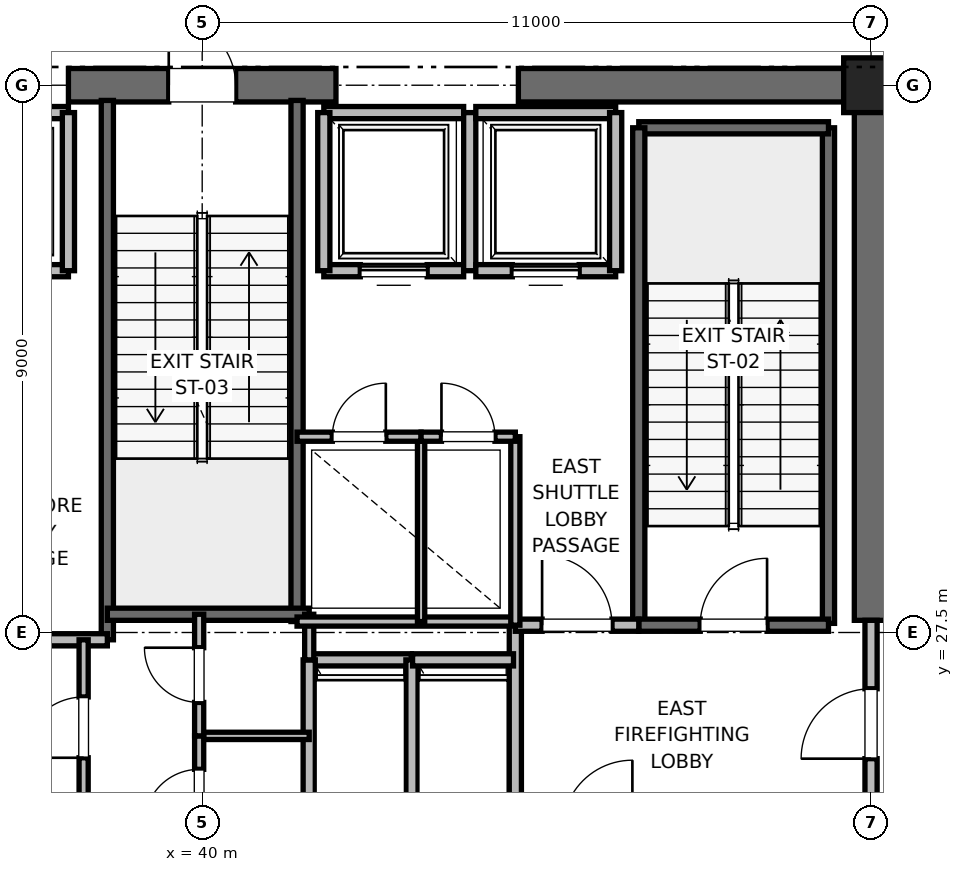
"""IFC4 building model, lengths in metres.
Left out: names, types, materials, properties, quantities, classifications, styles, units other than length and angle.
Written with IfcOpenShell. Run it as: python <this file> out.ifc"""

import sys

from ifc_helpers import new_model, si_unit, direction, frame, frame_2d, origin, origin_2d, place, context, subcontext, project, spatial, rectangle, extrude, element, fill, save


model = new_model("IFC4")
c1 = context("Model", 3, precision=1e-05, world=origin(), true_north=direction((0.0, 1.0)))
c2 = subcontext(c1, "Body", "Model", "MODEL_VIEW")
j1 = project(units=[si_unit("LENGTHUNIT", "METRE"), si_unit("PLANEANGLEUNIT", "RADIAN")], contexts=[c1])
p1 = place(None, origin())
s1 = spatial("IfcSite", under=j1, at=p1, CompositionType="ELEMENT")
p2 = place(p1, origin())
s2 = spatial("IfcBuilding", under=s1, at=p2, CompositionType="ELEMENT")
p3 = place(p2, frame((0.0, 0.0, 233.2)))
s3 = spatial("IfcBuildingStorey", under=s2, at=p3, CompositionType="ELEMENT", Elevation=233.2)
p4 = place(p3, frame((51.0, 36.5, 0.0), z_axis=(0.0, 0.0, 1.0), x_axis=(1.0, 0.0, 0.0)))
e1 = element("IfcColumn", 1, at=p4, inside=s3, PredefinedType="PILASTER", context=c2, shape_type="SweptSolid", body=[
    extrude(rectangle(XDim=0.9, YDim=0.9, at=origin_2d()), origin(), (0.0, 0.0, 1.0), 5.0),
])
p5 = place(p3, frame((37.8, 36.5, 0.0), z_axis=(0.0, 0.0, 1.0), x_axis=(1.0, 0.0, 0.0)))
e2 = element("IfcWall", 2, at=p5, inside=s3, PredefinedType="SHEAR", context=c2, shape_type="SweptSolid", body=[
    extrude(rectangle(XDim=4.4, YDim=0.55, at=frame_2d((2.2, 0.0))), origin(), (0.0, 0.0, 1.0), 4.7),
])
p6 = place(p5, frame((1.65, 0.0, 0.0)))
e3 = element("IfcOpeningElement", 3, at=p6, cuts=e2, PredefinedType="OPENING", context=c2, shape_type="SweptSolid", body=[
    extrude(rectangle(XDim=1.1, YDim=2.15, at=frame_2d((0.55, 1.075))), frame((0.0, 0.275, 0.0), z_axis=(0.0, -1.0, 0.0), x_axis=(1.0, 0.0, 0.0)), (0.0, 0.0, 1.0), 0.55),
])
p7 = place(p3, frame((45.2, 36.5, 0.0), z_axis=(0.0, 0.0, 1.0), x_axis=(1.0, 0.0, 0.0)))
e4 = element("IfcWall", 4, at=p7, inside=s3, PredefinedType="SHEAR", context=c2, shape_type="SweptSolid", body=[
    extrude(rectangle(XDim=5.8, YDim=0.55, at=frame_2d((2.9, 0.0))), origin(), (0.0, 0.0, 1.0), 4.7),
])
p8 = place(p3, frame((51.0, 27.7, 0.0), z_axis=(0.0, 0.0, 1.0), x_axis=(0.0, 1.0, 0.0)))
e5 = element("IfcWall", 5, at=p8, inside=s3, PredefinedType="SHEAR", context=c2, shape_type="SweptSolid", body=[
    extrude(rectangle(XDim=8.8, YDim=0.55, at=frame_2d((4.4, 0.0))), origin(), (0.0, 0.0, 1.0), 4.7),
])
p9 = place(p3, frame((50.3, 27.65, 0.0), z_axis=(0.0, 0.0, 1.0), x_axis=(0.0, 1.0, 0.0)))
e6 = element("IfcWall", 6, at=p9, inside=s3, PredefinedType="SOLIDWALL", context=c2, shape_type="SweptSolid", body=[
    extrude(rectangle(XDim=8.15, YDim=0.2, at=frame_2d((4.075, 0.0))), origin(), (0.0, 0.0, 1.0), 4.7),
])
p10 = place(p3, frame((47.18, 35.8, 0.0), z_axis=(0.0, 0.0, 1.0), x_axis=(1.0, 0.0, 0.0)))
e7 = element("IfcWall", 7, at=p10, inside=s3, PredefinedType="SOLIDWALL", context=c2, shape_type="SweptSolid", body=[
    extrude(rectangle(XDim=3.12, YDim=0.2, at=frame_2d((1.56, 0.0))), origin(), (0.0, 0.0, 1.0), 4.7),
])
p11 = place(p3, frame((47.18, 27.62, 0.0), z_axis=(0.0, 0.0, 1.0), x_axis=(0.0, 1.0, 0.0)))
e8 = element("IfcWall", 8, at=p11, inside=s3, PredefinedType="SOLIDWALL", context=c2, shape_type="SweptSolid", body=[
    extrude(rectangle(XDim=8.18, YDim=0.2, at=frame_2d((4.09, 0.0))), origin(), (0.0, 0.0, 1.0), 4.7),
])
p12 = place(p3, frame((47.18, 27.62, 0.0), z_axis=(0.0, 0.0, 1.0), x_axis=(1.0, 0.0, 0.0)))
e9 = element("IfcWall", 9, at=p12, inside=s3, PredefinedType="SOLIDWALL", context=c2, shape_type="SweptSolid", body=[
    extrude(rectangle(XDim=3.12, YDim=0.2, at=frame_2d((1.56, 0.0))), origin(), (0.0, 0.0, 1.0), 4.7),
])
p13 = place(p12, frame((1.01, 0.0, 0.0)))
e10 = element("IfcOpeningElement", 10, at=p13, cuts=e9, PredefinedType="OPENING", context=c2, shape_type="SweptSolid", body=[
    extrude(rectangle(XDim=1.1, YDim=2.15, at=frame_2d((0.55, 1.075))), frame((0.0, 0.1, 0.0), z_axis=(0.0, -1.0, 0.0), x_axis=(1.0, 0.0, 0.0)), (0.0, 0.0, 1.0), 0.2),
])
p14 = place(p3, frame((38.44, 27.38, 0.0), z_axis=(0.0, 0.0, 1.0), x_axis=(0.0, 1.0, 0.0)))
e11 = element("IfcWall", 11, at=p14, inside=s3, PredefinedType="SOLIDWALL", context=c2, shape_type="SweptSolid", body=[
    extrude(rectangle(XDim=8.87, YDim=0.2, at=frame_2d((4.435, 0.0))), origin(), (0.0, 0.0, 1.0), 4.7),
])
p15 = place(p3, frame((41.56, 27.68, 0.0), z_axis=(0.0, 0.0, 1.0), x_axis=(0.0, 1.0, 0.0)))
e12 = element("IfcWall", 12, at=p15, inside=s3, PredefinedType="SOLIDWALL", context=c2, shape_type="SweptSolid", body=[
    extrude(rectangle(XDim=8.57, YDim=0.2, at=frame_2d((4.285, 0.0))), origin(), (0.0, 0.0, 1.0), 4.7),
])
p16 = place(p3, frame((38.44, 27.8, 0.0), z_axis=(0.0, 0.0, 1.0), x_axis=(1.0, 0.0, 0.0)))
e13 = element("IfcWall", 13, at=p16, inside=s3, PredefinedType="SOLIDWALL", context=c2, shape_type="SweptSolid", body=[
    extrude(rectangle(XDim=3.32, YDim=0.2, at=frame_2d((1.66, 0.0))), origin(), (0.0, 0.0, 1.0), 4.7),
])
p17 = place(p3, frame((32.82, 27.38, 0.0), z_axis=(0.0, 0.0, 1.0), x_axis=(1.0, 0.0, 0.0)))
e14 = element("IfcWall", 14, at=p17, inside=s3, PredefinedType="PARTITIONING", context=c2, shape_type="SweptSolid", body=[
    extrude(rectangle(XDim=5.62, YDim=0.2, at=frame_2d((2.81, 0.0))), origin(), (0.0, 0.0, 1.0), 4.7),
])
p18 = place(p3, frame((45.15, 24.25, 0.0), z_axis=(0.0, 0.0, 1.0), x_axis=(0.0, 1.0, 0.0)))
e15 = element("IfcWall", 15, at=p18, inside=s3, PredefinedType="PARTITIONING", context=c2, shape_type="SweptSolid", body=[
    extrude(rectangle(XDim=3.37, YDim=0.2, at=frame_2d((1.685, 0.0))), origin(), (0.0, 0.0, 1.0), 4.7),
])
p19 = place(p3, frame((45.15, 27.62, 0.0), z_axis=(0.0, 0.0, 1.0), x_axis=(1.0, 0.0, 0.0)))
e16 = element("IfcWall", 16, at=p19, inside=s3, PredefinedType="PARTITIONING", context=c2, shape_type="SweptSolid", body=[
    extrude(rectangle(XDim=2.03, YDim=0.2, at=frame_2d((1.015, 0.0))), origin(), (0.0, 0.0, 1.0), 4.7),
])
p20 = place(p19, frame((0.44, 0.0, 0.0)))
e17 = element("IfcOpeningElement", 17, at=p20, cuts=e16, PredefinedType="OPENING", context=c2, shape_type="SweptSolid", body=[
    extrude(rectangle(XDim=1.15, YDim=2.2, at=frame_2d((0.575, 1.1))), frame((0.0, 0.1, 0.0), z_axis=(0.0, -1.0, 0.0), x_axis=(1.0, 0.0, 0.0)), (0.0, 0.0, 1.0), 0.2),
])
p21 = place(p3, frame((51.0, 24.3, 0.0), z_axis=(0.0, 0.0, 1.0), x_axis=(0.0, 1.0, 0.0)))
e18 = element("IfcWall", 18, at=p21, inside=s3, PredefinedType="PARTITIONING", context=c2, shape_type="SweptSolid", body=[
    extrude(rectangle(XDim=3.4, YDim=0.2, at=frame_2d((1.7, 0.0))), origin(), (0.0, 0.0, 1.0), 3.68),
])
p22 = place(p21, frame((1.125, 0.0, 0.0)))
e19 = element("IfcOpeningElement", 19, at=p22, cuts=e18, PredefinedType="OPENING", context=c2, shape_type="SweptSolid", body=[
    extrude(rectangle(XDim=1.15, YDim=2.2, at=frame_2d((0.575, 1.1))), frame((0.0, 0.1, 0.0), z_axis=(0.0, -1.0, 0.0), x_axis=(1.0, 0.0, 0.0)), (0.0, 0.0, 1.0), 0.2),
])
p23 = place(p3, frame((43.44, 27.05, 0.0), z_axis=(0.0, 0.0, 1.0), x_axis=(-1.0, 0.0, 0.0)))
e20 = element("IfcWall", 20, at=p23, inside=s3, PredefinedType="SOLIDWALL", context=c2, shape_type="SweptSolid", body=[
    extrude(rectangle(XDim=1.68, YDim=0.2, at=frame_2d((0.84, 0.0))), origin(), (0.0, 0.0, 1.0), 4.7),
])
for number, where, z_axis, x_axis in (
    (21, (41.76, 27.05, 0.0), (0.0, 0.0, 1.0), (0.0, -1.0, 0.0)),
    (22, (43.45, 24.45, 0.0), (0.0, 0.0, 1.0), (0.0, 1.0, 0.0)),
):
    element("IfcWall", number, at=place(p3, frame(where, z_axis=z_axis, x_axis=x_axis)), inside=s3, PredefinedType="SOLIDWALL", context=c2, shape_type="SweptSolid", body=[
        extrude(rectangle(XDim=2.6, YDim=0.2, at=frame_2d((1.3, 0.0))), origin(), (0.0, 0.0, 1.0), 4.7),
    ])
p24 = place(p3, frame((45.12, 27.05, 0.0), z_axis=(0.0, 0.0, 1.0), x_axis=(-1.0, 0.0, 0.0)))
e23 = element("IfcWall", 23, at=p24, inside=s3, PredefinedType="SOLIDWALL", context=c2, shape_type="SweptSolid", body=[
    extrude(rectangle(XDim=1.66, YDim=0.2, at=frame_2d((0.83, 0.0))), origin(), (0.0, 0.0, 1.0), 4.7),
])
p25 = place(p3, frame((35.5, 33.45, 0.0), z_axis=(0.0, 0.0, 1.0), x_axis=(1.0, 0.0, 0.0)))
e24 = element("IfcWall", 24, at=p25, inside=s3, PredefinedType="SOLIDWALL", context=c2, shape_type="SweptSolid", body=[
    extrude(rectangle(XDim=2.3, YDim=0.2, at=frame_2d((1.15, 0.0))), origin(), (0.0, 0.0, 1.0), 4.7),
])
p26 = place(p25, frame((0.6, 0.0, 0.0)))
e25 = element("IfcOpeningElement", 25, at=p26, cuts=e24, PredefinedType="OPENING", context=c2, shape_type="SweptSolid", body=[
    extrude(rectangle(XDim=1.1, YDim=2.2, at=frame_2d((0.55, 1.1))), frame((0.0, 0.1, 0.0), z_axis=(0.0, -1.0, 0.0), x_axis=(1.0, 0.0, 0.0)), (0.0, 0.0, 1.0), 0.2),
])
p27 = place(p3, frame((37.8, 36.05, 0.0), z_axis=(0.0, 0.0, 1.0), x_axis=(-1.0, 0.0, 0.0)))
e26 = element("IfcWall", 26, at=p27, inside=s3, PredefinedType="SOLIDWALL", context=c2, shape_type="SweptSolid", body=[
    extrude(rectangle(XDim=2.3, YDim=0.2, at=frame_2d((1.15, 0.0))), origin(), (0.0, 0.0, 1.0), 3.68),
])
p28 = place(p3, frame((37.8, 33.45, 0.0), z_axis=(0.0, 0.0, 1.0), x_axis=(0.0, 1.0, 0.0)))
e27 = element("IfcWall", 27, at=p28, inside=s3, PredefinedType="SOLIDWALL", context=c2, shape_type="SweptSolid", body=[
    extrude(rectangle(XDim=2.6, YDim=0.2, at=frame_2d((1.3, 0.0))), origin(), (0.0, 0.0, 1.0), 3.68),
])
p29 = place(p3, frame((42.0, 33.45, 0.0), z_axis=(0.0, 0.0, 1.0), x_axis=(1.0, 0.0, 0.0)))
e28 = element("IfcWall", 28, at=p29, inside=s3, PredefinedType="SOLIDWALL", context=c2, shape_type="SweptSolid", body=[
    extrude(rectangle(XDim=2.3, YDim=0.2, at=frame_2d((1.15, 0.0))), origin(), (0.0, 0.0, 1.0), 4.7),
])
p30 = place(p29, frame((0.6, 0.0, 0.0)))
e29 = element("IfcOpeningElement", 29, at=p30, cuts=e28, PredefinedType="OPENING", context=c2, shape_type="SweptSolid", body=[
    extrude(rectangle(XDim=1.1, YDim=2.2, at=frame_2d((0.55, 1.1))), frame((0.0, 0.1, 0.0), z_axis=(0.0, -1.0, 0.0), x_axis=(1.0, 0.0, 0.0)), (0.0, 0.0, 1.0), 0.2),
])
p31 = place(p3, frame((44.3, 36.05, 0.0), z_axis=(0.0, 0.0, 1.0), x_axis=(-1.0, 0.0, 0.0)))
e30 = element("IfcWall", 30, at=p31, inside=s3, PredefinedType="SOLIDWALL", context=c2, shape_type="SweptSolid", body=[
    extrude(rectangle(XDim=2.3, YDim=0.2, at=frame_2d((1.15, 0.0))), origin(), (0.0, 0.0, 1.0), 3.68),
])
for number, where, z_axis, x_axis in (
    (31, (42.0, 36.05, 0.0), (0.0, 0.0, 1.0), (0.0, -1.0, 0.0)),
    (32, (44.4, 33.45, 0.0), (0.0, 0.0, 1.0), (0.0, 1.0, 0.0)),
):
    element("IfcWall", number, at=place(p3, frame(where, z_axis=z_axis, x_axis=x_axis)), inside=s3, PredefinedType="SOLIDWALL", context=c2, shape_type="SweptSolid", body=[
        extrude(rectangle(XDim=2.6, YDim=0.2, at=frame_2d((1.3, 0.0))), origin(), (0.0, 0.0, 1.0), 3.68),
    ])
p32 = place(p3, frame((44.5, 33.45, 0.0), z_axis=(0.0, 0.0, 1.0), x_axis=(1.0, 0.0, 0.0)))
e33 = element("IfcWall", 33, at=p32, inside=s3, PredefinedType="SOLIDWALL", context=c2, shape_type="SweptSolid", body=[
    extrude(rectangle(XDim=2.3, YDim=0.2, at=frame_2d((1.15, 0.0))), origin(), (0.0, 0.0, 1.0), 4.7),
])
p33 = place(p32, frame((0.6, 0.0, 0.0)))
e34 = element("IfcOpeningElement", 34, at=p33, cuts=e33, PredefinedType="OPENING", context=c2, shape_type="SweptSolid", body=[
    extrude(rectangle(XDim=1.1, YDim=2.2, at=frame_2d((0.55, 1.1))), frame((0.0, 0.1, 0.0), z_axis=(0.0, -1.0, 0.0), x_axis=(1.0, 0.0, 0.0)), (0.0, 0.0, 1.0), 0.2),
])
p34 = place(p3, frame((46.8, 36.05, 0.0), z_axis=(0.0, 0.0, 1.0), x_axis=(-1.0, 0.0, 0.0)))
e35 = element("IfcWall", 35, at=p34, inside=s3, PredefinedType="SOLIDWALL", context=c2, shape_type="SweptSolid", body=[
    extrude(rectangle(XDim=2.3, YDim=0.2, at=frame_2d((1.15, 0.0))), origin(), (0.0, 0.0, 1.0), 3.68),
])
p35 = place(p3, frame((46.8, 33.45, 0.0), z_axis=(0.0, 0.0, 1.0), x_axis=(0.0, 1.0, 0.0)))
e36 = element("IfcWall", 36, at=p35, inside=s3, PredefinedType="SOLIDWALL", context=c2, shape_type="SweptSolid", body=[
    extrude(rectangle(XDim=2.6, YDim=0.2, at=frame_2d((1.3, 0.0))), origin(), (0.0, 0.0, 1.0), 4.7),
])
p36 = place(p3, frame((39.95, 25.8, 0.0), z_axis=(0.0, 0.0, 1.0), x_axis=(1.0, 0.0, 0.0)))
e37 = element("IfcWall", 37, at=p36, inside=s3, PredefinedType="PARTITIONING", context=c2, shape_type="SweptSolid", body=[
    extrude(rectangle(XDim=1.81, YDim=0.12, at=frame_2d((0.905, 0.0))), origin(), (0.0, 0.0, 1.0), 2.85),
])
p37 = place(p3, frame((41.76, 27.05, 0.0), z_axis=(0.0, 0.0, 1.0), x_axis=(0.0, 1.0, 0.0)))
e38 = element("IfcWall", 38, at=p37, inside=s3, PredefinedType="PARTITIONING", context=c2, shape_type="SweptSolid", body=[
    extrude(rectangle(XDim=0.75, YDim=0.15, at=frame_2d((0.375, 0.0))), origin(), (0.0, 0.0, 1.0), 2.85),
])
p38 = place(p3, frame((39.95, 23.8, 0.0), z_axis=(0.0, 0.0, 1.0), x_axis=(0.0, 1.0, 0.0)))
e39 = element("IfcWall", 39, at=p38, inside=s3, PredefinedType="PARTITIONING", context=c2, shape_type="SweptSolid", body=[
    extrude(rectangle(XDim=2.0, YDim=0.15, at=frame_2d((1.0, 0.0))), origin(), (0.0, 0.0, 1.0), 2.85),
])
p39 = place(p38, frame((0.55, 0.0, 0.0)))
e40 = element("IfcOpeningElement", 40, at=p39, cuts=e39, PredefinedType="OPENING", context=c2, shape_type="SweptSolid", body=[
    extrude(rectangle(XDim=0.9, YDim=2.1, at=frame_2d((0.45, 1.05))), frame((0.0, 0.075, 0.0), z_axis=(0.0, -1.0, 0.0), x_axis=(1.0, 0.0, 0.0)), (0.0, 0.0, 1.0), 0.15),
])
p40 = place(p3, frame((39.95, 25.8, 0.0), z_axis=(0.0, 0.0, 1.0), x_axis=(0.0, 1.0, 0.0)))
e41 = element("IfcWall", 41, at=p40, inside=s3, PredefinedType="PARTITIONING", context=c2, shape_type="SweptSolid", body=[
    extrude(rectangle(XDim=2.0, YDim=0.15, at=frame_2d((1.0, 0.0))), origin(), (0.0, 0.0, 1.0), 2.85),
])
p41 = place(p40, frame((0.55, 0.0, 0.0)))
e42 = element("IfcOpeningElement", 42, at=p41, cuts=e41, PredefinedType="OPENING", context=c2, shape_type="SweptSolid", body=[
    extrude(rectangle(XDim=0.9, YDim=2.1, at=frame_2d((0.45, 1.05))), frame((0.0, 0.075, 0.0), z_axis=(0.0, -1.0, 0.0), x_axis=(1.0, 0.0, 0.0)), (0.0, 0.0, 1.0), 0.15),
])
p42 = place(p3, frame((38.05, 24.5, 0.0), z_axis=(0.0, 0.0, 1.0), x_axis=(0.0, 1.0, 0.0)))
e43 = element("IfcWall", 43, at=p42, inside=s3, PredefinedType="PARTITIONING", context=c2, shape_type="SweptSolid", body=[
    extrude(rectangle(XDim=2.88, YDim=0.15, at=frame_2d((1.44, 0.0))), origin(), (0.0, 0.0, 1.0), 2.85),
])
p43 = place(p42, frame((0.94, 0.0, 0.0)))
e44 = element("IfcOpeningElement", 44, at=p43, cuts=e43, PredefinedType="OPENING", context=c2, shape_type="SweptSolid", body=[
    extrude(rectangle(XDim=1.0, YDim=2.15, at=frame_2d((0.5, 1.075))), frame((0.0, 0.075, 0.0), z_axis=(0.0, -1.0, 0.0), x_axis=(1.0, 0.0, 0.0)), (0.0, 0.0, 1.0), 0.15),
])
p44 = place(p3, frame((41.56, 27.68, 0.0), z_axis=(0.0, 0.0, 1.0), x_axis=(1.0, 0.0, 0.0)))
e45 = element("IfcWall", 45, at=p44, inside=s3, PredefinedType="PARTITIONING", context=c2, shape_type="SweptSolid", body=[
    extrude(rectangle(XDim=3.59, YDim=0.15, at=frame_2d((1.795, 0.0))), origin(), (0.0, 0.0, 1.0), 2.85),
])
p45 = place(p3, frame((45.15, 27.62, 0.0), z_axis=(0.0, 0.0, 1.0), x_axis=(0.0, 1.0, 0.0)))
e46 = element("IfcWall", 46, at=p45, inside=s3, PredefinedType="PARTITIONING", context=c2, shape_type="SweptSolid", body=[
    extrude(rectangle(XDim=3.1, YDim=0.15, at=frame_2d((1.55, 0.0))), origin(), (0.0, 0.0, 1.0), 2.85),
])
p46 = place(p3, frame((43.6, 27.68, 0.0), z_axis=(0.0, 0.0, 1.0), x_axis=(0.0, 1.0, 0.0)))
e47 = element("IfcWall", 47, at=p46, inside=s3, PredefinedType="PARTITIONING", context=c2, shape_type="SweptSolid", body=[
    extrude(rectangle(XDim=3.04, YDim=0.12, at=frame_2d((1.52, 0.0))), origin(), (0.0, 0.0, 1.0), 2.85),
])
p47 = place(p3, frame((41.56, 30.72, 0.0), z_axis=(0.0, 0.0, 1.0), x_axis=(1.0, 0.0, 0.0)))
e48 = element("IfcWall", 48, at=p47, inside=s3, PredefinedType="PARTITIONING", context=c2, shape_type="SweptSolid", body=[
    extrude(rectangle(XDim=2.04, YDim=0.15, at=frame_2d((1.02, 0.0))), origin(), (0.0, 0.0, 1.0), 2.85),
])
p48 = place(p47, frame((0.58, 0.0, 0.0)))
e49 = element("IfcOpeningElement", 49, at=p48, cuts=e48, PredefinedType="OPENING", context=c2, shape_type="SweptSolid", body=[
    extrude(rectangle(XDim=0.88, YDim=2.1, at=frame_2d((0.44, 1.05))), frame((0.0, 0.075, 0.0), z_axis=(0.0, -1.0, 0.0), x_axis=(1.0, 0.0, 0.0)), (0.0, 0.0, 1.0), 0.15),
])
p49 = place(p3, frame((43.6, 30.72, 0.0), z_axis=(0.0, 0.0, 1.0), x_axis=(1.0, 0.0, 0.0)))
e50 = element("IfcWall", 50, at=p49, inside=s3, PredefinedType="PARTITIONING", context=c2, shape_type="SweptSolid", body=[
    extrude(rectangle(XDim=1.55, YDim=0.15, at=frame_2d((0.775, 0.0))), origin(), (0.0, 0.0, 1.0), 2.85),
])
p50 = place(p49, frame((0.335, 0.0, 0.0)))
e51 = element("IfcOpeningElement", 51, at=p50, cuts=e50, PredefinedType="OPENING", context=c2, shape_type="SweptSolid", body=[
    extrude(rectangle(XDim=0.88, YDim=2.1, at=frame_2d((0.44, 1.05))), frame((0.0, 0.075, 0.0), z_axis=(0.0, -1.0, 0.0), x_axis=(1.0, 0.0, 0.0)), (0.0, 0.0, 1.0), 0.15),
])
p51 = place(p13, origin())
e52 = element("IfcDoor", 52, at=p51, inside=s3, OperationType="SINGLE_SWING_RIGHT", PredefinedType="DOOR", context=c2, shape_type="SweptSolid", body=[
    extrude(rectangle(XDim=1.1, YDim=2.15, at=frame_2d((0.55, 1.075))), frame((0.0, 0.025, 0.0), z_axis=(0.0, -1.0, 0.0), x_axis=(1.0, 0.0, 0.0)), (0.0, 0.0, 1.0), 0.05),
])
fill(e10, e52)
p52 = place(p6, origin())
e53 = element("IfcDoor", 53, at=p52, inside=s3, OperationType="SINGLE_SWING_LEFT", PredefinedType="DOOR", context=c2, shape_type="SweptSolid", body=[
    extrude(rectangle(XDim=1.1, YDim=2.15, at=frame_2d((0.55, 1.075))), frame((0.0, 0.025, 0.0), z_axis=(0.0, -1.0, 0.0), x_axis=(1.0, 0.0, 0.0)), (0.0, 0.0, 1.0), 0.05),
])
fill(e3, e53)
p53 = place(p20, origin())
e54 = element("IfcDoor", 54, at=p53, inside=s3, OperationType="SINGLE_SWING_LEFT", PredefinedType="DOOR", context=c2, shape_type="SweptSolid", body=[
    extrude(rectangle(XDim=1.15, YDim=2.2, at=frame_2d((0.575, 1.1))), frame((0.0, 0.025, 0.0), z_axis=(0.0, -1.0, 0.0), x_axis=(1.0, 0.0, 0.0)), (0.0, 0.0, 1.0), 0.05),
])
fill(e17, e54)
p54 = place(p22, origin())
e55 = element("IfcDoor", 55, at=p54, inside=s3, OperationType="SINGLE_SWING_LEFT", PredefinedType="DOOR", context=c2, shape_type="SweptSolid", body=[
    extrude(rectangle(XDim=1.15, YDim=2.2, at=frame_2d((0.575, 1.1))), frame((0.0, 0.025, 0.0), z_axis=(0.0, -1.0, 0.0), x_axis=(1.0, 0.0, 0.0)), (0.0, 0.0, 1.0), 0.05),
])
fill(e19, e55)
p55 = place(p30, origin())
e56 = element("IfcDoor", 56, at=p55, inside=s3, OperationType="SLIDING_TO_RIGHT", PredefinedType="DOOR", context=c2, shape_type="SweptSolid", body=[
    extrude(rectangle(XDim=1.1, YDim=2.2, at=frame_2d((0.55, 1.1))), frame((0.0, 0.025, 0.0), z_axis=(0.0, -1.0, 0.0), x_axis=(1.0, 0.0, 0.0)), (0.0, 0.0, 1.0), 0.05),
])
fill(e29, e56)
p56 = place(p33, origin())
e57 = element("IfcDoor", 57, at=p56, inside=s3, OperationType="SLIDING_TO_RIGHT", PredefinedType="DOOR", context=c2, shape_type="SweptSolid", body=[
    extrude(rectangle(XDim=1.1, YDim=2.2, at=frame_2d((0.55, 1.1))), frame((0.0, 0.025, 0.0), z_axis=(0.0, -1.0, 0.0), x_axis=(1.0, 0.0, 0.0)), (0.0, 0.0, 1.0), 0.05),
])
fill(e34, e57)
p57 = place(p39, origin())
e58 = element("IfcDoor", 58, at=p57, inside=s3, OperationType="SINGLE_SWING_LEFT", PredefinedType="DOOR", context=c2, shape_type="SweptSolid", body=[
    extrude(rectangle(XDim=0.9, YDim=2.1, at=frame_2d((0.45, 1.05))), frame((0.0, 0.025, 0.0), z_axis=(0.0, -1.0, 0.0), x_axis=(1.0, 0.0, 0.0)), (0.0, 0.0, 1.0), 0.05),
])
fill(e40, e58)
p58 = place(p41, origin())
e59 = element("IfcDoor", 59, at=p58, inside=s3, OperationType="SINGLE_SWING_RIGHT", PredefinedType="DOOR", context=c2, shape_type="SweptSolid", body=[
    extrude(rectangle(XDim=0.9, YDim=2.1, at=frame_2d((0.45, 1.05))), frame((0.0, 0.025, 0.0), z_axis=(0.0, -1.0, 0.0), x_axis=(1.0, 0.0, 0.0)), (0.0, 0.0, 1.0), 0.05),
])
fill(e42, e59)
p59 = place(p43, origin())
e60 = element("IfcDoor", 60, at=p59, inside=s3, OperationType="SINGLE_SWING_LEFT", PredefinedType="DOOR", context=c2, shape_type="SweptSolid", body=[
    extrude(rectangle(XDim=1.0, YDim=2.15, at=frame_2d((0.5, 1.075))), frame((0.0, 0.025, 0.0), z_axis=(0.0, -1.0, 0.0), x_axis=(1.0, 0.0, 0.0)), (0.0, 0.0, 1.0), 0.05),
])
fill(e44, e60)
p60 = place(p48, origin())
e61 = element("IfcDoor", 61, at=p60, inside=s3, OperationType="SINGLE_SWING_RIGHT", PredefinedType="DOOR", context=c2, shape_type="SweptSolid", body=[
    extrude(rectangle(XDim=0.88, YDim=2.1, at=frame_2d((0.44, 1.05))), frame((0.0, 0.025, 0.0), z_axis=(0.0, -1.0, 0.0), x_axis=(1.0, 0.0, 0.0)), (0.0, 0.0, 1.0), 0.05),
])
fill(e49, e61)
p61 = place(p50, origin())
e62 = element("IfcDoor", 62, at=p61, inside=s3, OperationType="SINGLE_SWING_LEFT", PredefinedType="DOOR", context=c2, shape_type="SweptSolid", body=[
    extrude(rectangle(XDim=0.88, YDim=2.1, at=frame_2d((0.44, 1.05))), frame((0.0, 0.025, 0.0), z_axis=(0.0, -1.0, 0.0), x_axis=(1.0, 0.0, 0.0)), (0.0, 0.0, 1.0), 0.05),
])
fill(e51, e62)
save(model, sys.argv[1])
